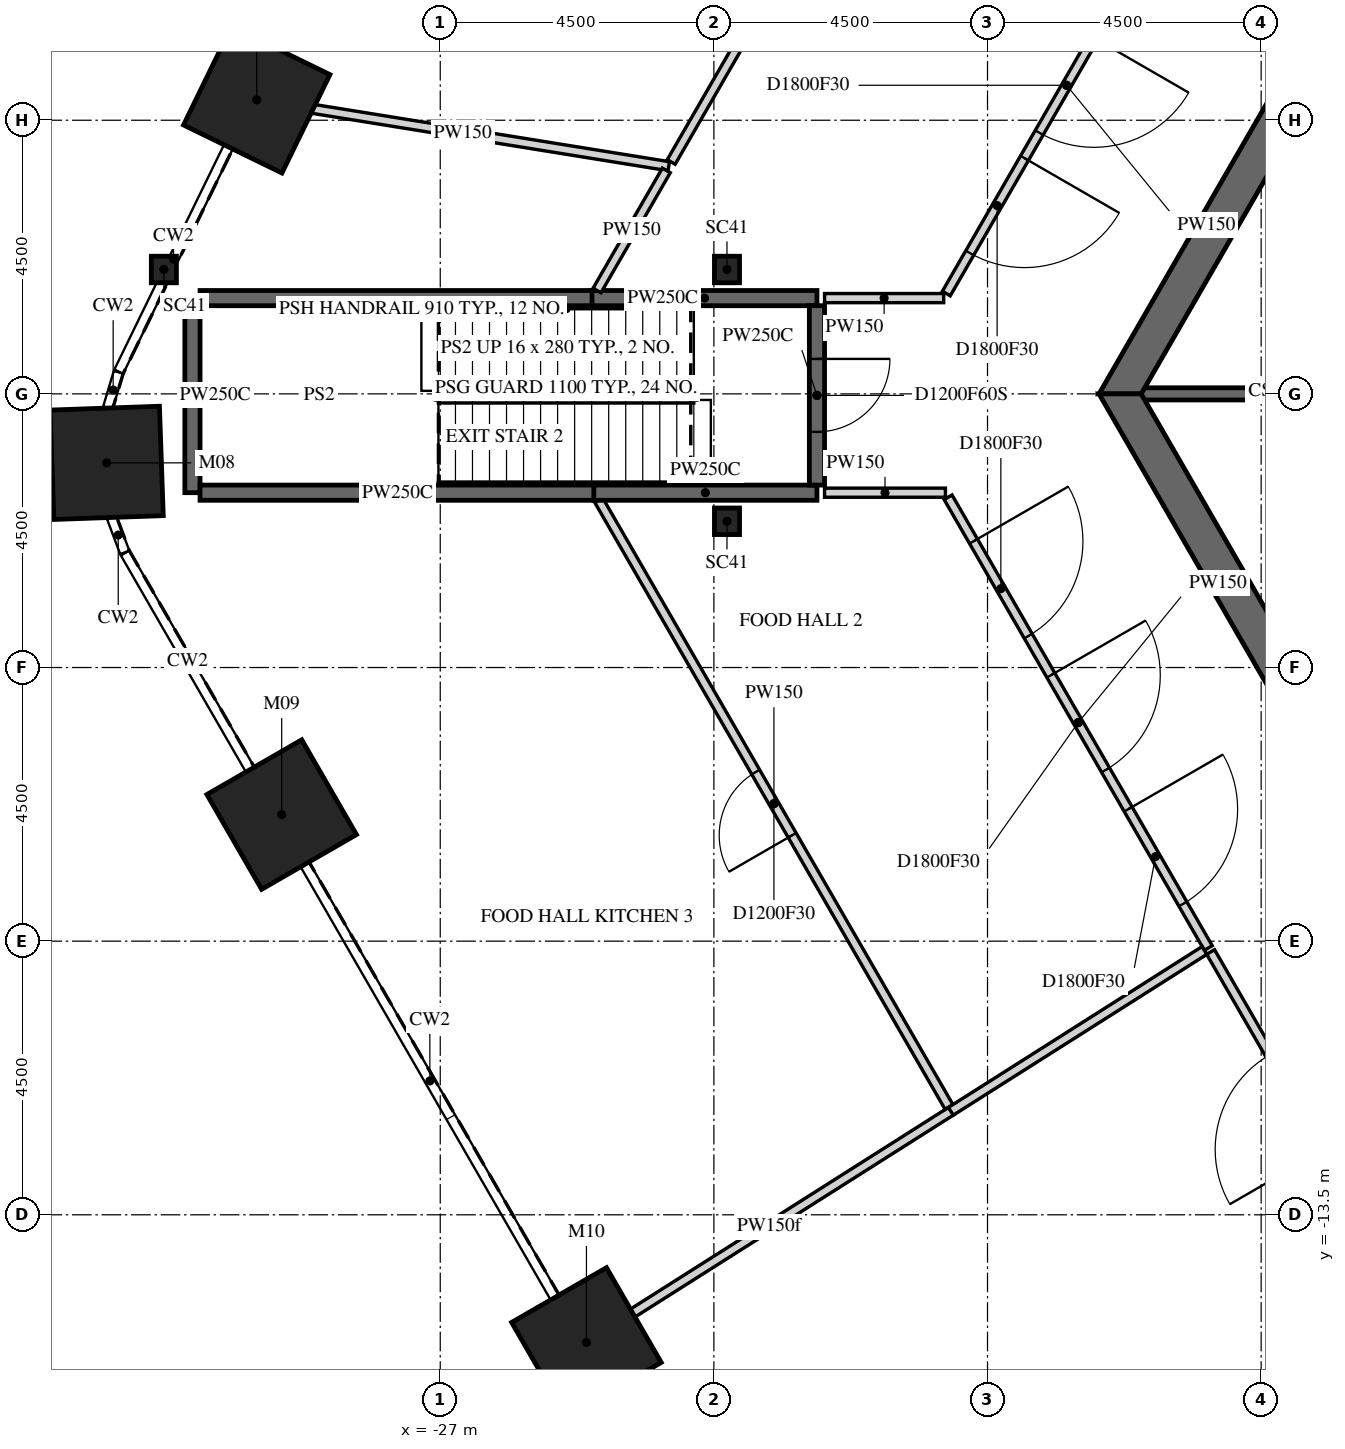
"""IFC4 building model, lengths in metres.
Left out: names, types, materials, properties, quantities, classifications, styles, units other than length and angle.
Written with IfcOpenShell. Run it as: python <this file> out.ifc"""

import sys

from ifc_helpers import new_model, si_unit, direction, frame, frame_2d, origin, origin_2d, place, context, subcontext, project, spatial, polyline, rectangle, i_section, outline, extrude, element, fill, save


model = new_model("IFC4")
c1 = context("Model", 3, precision=1e-05, world=origin(), true_north=direction((0.0, 1.0)))
c2 = subcontext(c1, "Body", "Model", "MODEL_VIEW")
j1 = project(units=[si_unit("LENGTHUNIT", "METRE"), si_unit("PLANEANGLEUNIT", "RADIAN")], contexts=[c1])
p1 = place(None, origin())
s1 = spatial("IfcSite", under=j1, at=p1, CompositionType="ELEMENT")
p2 = place(p1, origin())
s2 = spatial("IfcBuilding", under=s1, at=p2, CompositionType="ELEMENT")
p3 = place(p2, frame((0.0, 0.0, 20.5)))
s3 = spatial("IfcBuildingStorey", under=s2, at=p3, CompositionType="ELEMENT", Elevation=20.5)
for number, where, z_axis, x_axis in (
    (1, (-30.018, 4.836, -0.25), (0.0, 0.0, 1.0), (0.438, 0.899, 0.0)),
    (2, (-32.486, -1.135, -0.25), (0.0, 0.0, 1.0), (-0.035, 0.999, 0.0)),
    (3, (-29.608, -6.918, -0.25), (0.0, 0.0, 1.0), (-0.5, 0.866, 0.0)),
    (4, (-24.596, -15.599, -0.25), (0.0, 0.0, 1.0), (-0.5, 0.866, 0.0)),
):
    element("IfcColumn", number, at=place(p3, frame(where, z_axis=z_axis, x_axis=x_axis)), inside=s3, PredefinedType="COLUMN", context=c2, shape_type="SweptSolid", body=[
        extrude(rectangle(XDim=1.8, YDim=1.8, at=origin_2d()), origin(), (0.0, 0.0, 1.0), 5.5),
    ])
for number, where, z_axis, x_axis in (
    (5, (-31.545, 2.045, -0.25), (0.0, 0.0, 1.0), (1.0, 0.0, 0.0)),
    (6, (-22.285, 2.045, -0.25), (0.0, 0.0, 1.0), (1.0, 0.0, 0.0)),
    (7, (-22.285, -2.095, -0.25), (0.0, 0.0, 1.0), (1.0, 0.0, 0.0)),
):
    element("IfcColumn", number, at=place(p3, frame(where, z_axis=z_axis, x_axis=x_axis)), inside=s3, PredefinedType="COLUMN", context=c2, shape_type="SweptSolid", body=[
        extrude(i_section(OverallWidth=0.412, OverallDepth=0.437, WebThickness=0.036, FlangeThickness=0.058, FilletRadius=0.015, at=origin_2d()), origin(), (0.0, 0.0, 1.0), 5.5),
    ])
p4 = place(p3, frame((-7.91, 13.7, -0.25), z_axis=(0.0, 0.0, 1.0), x_axis=(-0.499999880136, -0.866025472988, 0.0)))
e8 = element("IfcWall", 8, at=p4, inside=s3, PredefinedType="SHEAR", context=c2, shape_type="SweptSolid", body=[
    extrude(outline(polyline([(-0.173, -0.3), (15.993, -0.3), (15.646, 0.3), (0.173, 0.3), (-0.173, -0.3)])), origin(), (0.0, 0.0, 1.0), 5.5),
])
p5 = place(p4, frame((7.039, 0.0, 0.25)))
e9 = element("IfcOpeningElement", 9, at=p5, cuts=e8, PredefinedType="OPENING", context=c2, shape_type="SweptSolid", body=[
    extrude(rectangle(XDim=1.8, YDim=2.4, at=frame_2d((0.9, 1.2))), frame((0.0, 0.31, 0.0), z_axis=(0.0, -1.0, 0.0), x_axis=(1.0, 0.0, 0.0)), (0.0, 0.0, 1.0), 0.62),
])
p6 = place(p3, frame((-15.819, 0.0, -0.25), z_axis=(0.0, 0.0, 1.0), x_axis=(0.499999880136, -0.866025472988, 0.0)))
e10 = element("IfcWall", 10, at=p6, inside=s3, PredefinedType="SHEAR", context=c2, shape_type="SweptSolid", body=[
    extrude(outline(polyline([(-0.173, -0.3), (15.993, -0.3), (15.646, 0.3), (0.173, 0.3), (-0.173, -0.3)])), origin(), (0.0, 0.0, 1.0), 5.5),
])
p7 = place(p6, frame((6.981, 0.0, 0.25)))
e11 = element("IfcOpeningElement", 11, at=p7, cuts=e10, PredefinedType="OPENING", context=c2, shape_type="SweptSolid", body=[
    extrude(rectangle(XDim=1.8, YDim=2.4, at=frame_2d((0.9, 1.2))), frame((0.0, 0.31, 0.0), z_axis=(0.0, -1.0, 0.0), x_axis=(1.0, 0.0, 0.0)), (0.0, 0.0, 1.0), 0.62),
])
p8 = place(p3, frame((-11.547, 0.0, -0.25), z_axis=(0.0, 0.0, 1.0), x_axis=(-1.0, 0.0, 0.0)))
e12 = element("IfcWall", 12, at=p8, inside=s3, PredefinedType="SHEAR", context=c2, shape_type="SweptSolid", body=[
    extrude(rectangle(XDim=3.926, YDim=0.2, at=frame_2d((1.963, 0.0))), origin(), (0.0, 0.0, 1.0), 5.5),
])
p9 = place(p3, frame((-31.075, -1.625, 0.0), z_axis=(0.0, 0.0, 1.0), x_axis=(0.0, 1.0, 0.0)))
e13 = element("IfcWall", 13, at=p9, inside=s3, PredefinedType="PARTITIONING", context=c2, shape_type="SweptSolid", body=[
    extrude(rectangle(XDim=3.2, YDim=0.25, at=frame_2d((1.6, 0.0))), origin(), (0.0, 0.0, 1.0), 5.25),
])
p10 = place(p3, frame((-30.95, 1.575, 0.0), z_axis=(0.0, 0.0, 1.0), x_axis=(1.0, 0.0, 0.0)))
e14 = element("IfcWall", 14, at=p10, inside=s3, PredefinedType="PARTITIONING", context=c2, shape_type="SweptSolid", body=[
    extrude(rectangle(XDim=6.468, YDim=0.25, at=frame_2d((3.234, 0.0))), origin(), (0.0, 0.0, 1.0), 5.25),
])
p11 = place(p3, frame((-30.018, 4.836, 0.0), z_axis=(0.0, 0.0, 1.0), x_axis=(0.987261315122, -0.159107182941, 0.0)))
e15 = element("IfcWall", 15, at=p11, inside=s3, PredefinedType="PARTITIONING", context=c2, shape_type="SweptSolid", body=[
    extrude(rectangle(XDim=6.864, YDim=0.15, at=frame_2d((3.432, 0.0))), origin(), (0.0, 0.0, 1.0), 5.25),
])
p12 = place(p3, frame((-24.596, -15.599, 0.0), z_axis=(0.0, 0.0, 1.0), x_axis=(0.844481327027, 0.535584996339, 0.0)))
e16 = element("IfcWall", 16, at=p12, inside=s3, PredefinedType="PARTITIONING", context=c2, shape_type="SweptSolid", body=[
    extrude(rectangle(XDim=7.116, YDim=0.15, at=frame_2d((3.558, 0.0))), origin(), (0.0, 0.0, 1.0), 4.496),
])
p13 = place(p3, frame((-24.504, 1.575, 0.0), z_axis=(0.0, 0.0, 1.0), x_axis=(1.0, 0.0, 0.0)))
e17 = element("IfcWall", 17, at=p13, inside=s3, PredefinedType="PARTITIONING", context=c2, shape_type="SweptSolid", body=[
    extrude(rectangle(XDim=3.699, YDim=0.25, at=frame_2d((1.85, 0.0))), origin(), (0.0, 0.0, 1.0), 5.25),
])
p14 = place(p3, frame((-18.633, -11.728, 0.0), z_axis=(0.0, 0.0, 1.0), x_axis=(-0.499963358889, 0.866046557506, 0.0)))
e18 = element("IfcWall", 18, at=p14, inside=s3, PredefinedType="PARTITIONING", context=c2, shape_type="SweptSolid", body=[
    extrude(rectangle(XDim=11.521, YDim=0.15, at=frame_2d((5.761, 0.0))), origin(), (0.0, 0.0, 1.0), 5.25),
])
p15 = place(p14, frame((5.161, 0.0, 0.0)))
e19 = element("IfcOpeningElement", 19, at=p15, cuts=e18, PredefinedType="OPENING", context=c2, shape_type="SweptSolid", body=[
    extrude(rectangle(XDim=1.2, YDim=2.1, at=frame_2d((0.6, 1.05))), frame((0.0, 0.085, 0.0), z_axis=(0.0, -1.0, 0.0), x_axis=(1.0, 0.0, 0.0)), (0.0, 0.0, 1.0), 0.17),
])
p16 = place(p3, frame((-24.453, -1.625, 0.0), z_axis=(0.0, 0.0, 1.0), x_axis=(-1.0, 0.0, 0.0)))
e20 = element("IfcWall", 20, at=p16, inside=s3, PredefinedType="PARTITIONING", context=c2, shape_type="SweptSolid", body=[
    extrude(rectangle(XDim=6.497, YDim=0.25, at=frame_2d((3.249, 0.0))), origin(), (0.0, 0.0, 1.0), 5.25),
])
p17 = place(p3, frame((-23.282, 3.675, 0.0), z_axis=(0.0, 0.0, 1.0), x_axis=(-0.49987077196, -0.866100000774, 0.0)))
e21 = element("IfcWall", 21, at=p17, inside=s3, PredefinedType="PARTITIONING", context=c2, shape_type="SweptSolid", body=[
    extrude(rectangle(XDim=2.28, YDim=0.15, at=frame_2d((1.14, 0.0))), origin(), (0.0, 0.0, 1.0), 5.25),
])
p18 = place(p3, frame((-20.805, -1.625, 0.0), z_axis=(0.0, 0.0, 1.0), x_axis=(-1.0, 0.0, 0.0)))
e22 = element("IfcWall", 22, at=p18, inside=s3, PredefinedType="PARTITIONING", context=c2, shape_type="SweptSolid", body=[
    extrude(rectangle(XDim=3.67, YDim=0.25, at=frame_2d((1.835, 0.0))), origin(), (0.0, 0.0, 1.0), 5.25),
])
p19 = place(p3, frame((-20.805, 1.45, 0.0), z_axis=(0.0, 0.0, 1.0), x_axis=(0.0, -1.0, 0.0)))
e23 = element("IfcWall", 23, at=p19, inside=s3, PredefinedType="PARTITIONING", context=c2, shape_type="SweptSolid", body=[
    extrude(rectangle(XDim=2.95, YDim=0.25, at=frame_2d((1.475, 0.0))), origin(), (0.0, 0.0, 1.0), 5.25),
])
p20 = place(p19, frame((0.875, 0.0, 0.0)))
e24 = element("IfcOpeningElement", 24, at=p20, cuts=e23, PredefinedType="OPENING", context=c2, shape_type="SweptSolid", body=[
    extrude(rectangle(XDim=1.2, YDim=2.1, at=frame_2d((0.6, 1.05))), frame((0.0, 0.135, 0.0), z_axis=(0.0, -1.0, 0.0), x_axis=(1.0, 0.0, 0.0)), (0.0, 0.0, 1.0), 0.27),
])
p21 = place(p3, frame((-20.68, 1.575, 0.0), z_axis=(0.0, 0.0, 1.0), x_axis=(1.0, 0.0, 0.0)))
e25 = element("IfcWall", 25, at=p21, inside=s3, PredefinedType="PARTITIONING", context=c2, shape_type="SweptSolid", body=[
    extrude(rectangle(XDim=1.959, YDim=0.15, at=frame_2d((0.979, 0.0))), origin(), (0.0, 0.0, 1.0), 5.25),
])
p22 = place(p3, frame((-19.584, -24.28, 0.0), z_axis=(0.0, 0.0, 1.0), x_axis=(0.627807267634, 0.77836882948, 0.0)))
e26 = element("IfcWall", 26, at=p22, inside=s3, PredefinedType="PARTITIONING", context=c2, shape_type="SweptSolid", body=[
    extrude(rectangle(XDim=12.971, YDim=0.15, at=frame_2d((6.485, 0.0))), origin(), (0.0, 0.0, 1.0), 5.25),
])
p23 = place(p3, frame((-18.692, -1.625, 0.0), z_axis=(0.0, 0.0, 1.0), x_axis=(-1.0, 0.0, 0.0)))
e27 = element("IfcWall", 27, at=p23, inside=s3, PredefinedType="PARTITIONING", context=c2, shape_type="SweptSolid", body=[
    extrude(rectangle(XDim=1.988, YDim=0.15, at=frame_2d((0.994, 0.0))), origin(), (0.0, 0.0, 1.0), 5.25),
])
p24 = place(p3, frame((-18.649, -1.7, 0.0), z_axis=(0.0, 0.0, 1.0), x_axis=(0.499985805234, -0.866033598981, 0.0)))
e28 = element("IfcWall", 28, at=p24, inside=s3, PredefinedType="PARTITIONING", context=c2, shape_type="SweptSolid", body=[
    extrude(rectangle(XDim=8.56, YDim=0.15, at=frame_2d((4.28, 0.0))), origin(), (0.0, 0.0, 1.0), 5.25),
])
p25 = place(p24, frame((0.836, 0.0, 0.0)))
e29 = element("IfcOpeningElement", 29, at=p25, cuts=e28, PredefinedType="OPENING", context=c2, shape_type="SweptSolid", body=[
    extrude(rectangle(XDim=1.8, YDim=2.1, at=frame_2d((0.9, 1.05))), frame((0.0, 0.085, 0.0), z_axis=(0.0, -1.0, 0.0), x_axis=(1.0, 0.0, 0.0)), (0.0, 0.0, 1.0), 0.17),
])
p26 = place(p24, frame((3.38, 0.0, 0.0)))
e30 = element("IfcOpeningElement", 30, at=p26, cuts=e28, PredefinedType="OPENING", context=c2, shape_type="SweptSolid", body=[
    extrude(rectangle(XDim=1.8, YDim=2.1, at=frame_2d((0.9, 1.05))), frame((0.0, 0.085, 0.0), z_axis=(0.0, -1.0, 0.0), x_axis=(1.0, 0.0, 0.0)), (0.0, 0.0, 1.0), 0.17),
])
p27 = place(p24, frame((5.924, 0.0, 0.0)))
e31 = element("IfcOpeningElement", 31, at=p27, cuts=e28, PredefinedType="OPENING", context=c2, shape_type="SweptSolid", body=[
    extrude(rectangle(XDim=1.8, YDim=2.1, at=frame_2d((0.9, 1.05))), frame((0.0, 0.085, 0.0), z_axis=(0.0, -1.0, 0.0), x_axis=(1.0, 0.0, 0.0)), (0.0, 0.0, 1.0), 0.17),
])
p28 = place(p3, frame((-18.603, -11.798, 0.0), z_axis=(0.0, 0.0, 1.0), x_axis=(0.844511305062, 0.535537725677, 0.0)))
e32 = element("IfcWall", 32, at=p28, inside=s3, PredefinedType="PARTITIONING", context=c2, shape_type="SweptSolid", body=[
    extrude(rectangle(XDim=4.938, YDim=0.15, at=frame_2d((2.469, 0.0))), origin(), (0.0, 0.0, 1.0), 4.496),
])
p29 = place(p3, frame((-23.202, 3.813, 0.0), z_axis=(0.0, 0.0, 1.0), x_axis=(0.500012104326, 0.866018415236, 0.0)))
e33 = element("IfcWall", 33, at=p29, inside=s3, PredefinedType="PARTITIONING", context=c2, shape_type="SweptSolid", body=[
    extrude(rectangle(XDim=9.193, YDim=0.15, at=frame_2d((4.597, 0.0))), origin(), (0.0, 0.0, 1.0), 5.25),
])
p30 = place(p29, frame((3.997, 0.0, 0.0)))
e34 = element("IfcOpeningElement", 34, at=p30, cuts=e33, PredefinedType="OPENING", context=c2, shape_type="SweptSolid", body=[
    extrude(rectangle(XDim=1.2, YDim=2.1, at=frame_2d((0.6, 1.05))), frame((0.0, 0.085, 0.0), z_axis=(0.0, -1.0, 0.0), x_axis=(1.0, 0.0, 0.0)), (0.0, 0.0, 1.0), 0.17),
])
p31 = place(p3, frame((-14.722, 8.5, 0.0), z_axis=(0.0, 0.0, 1.0), x_axis=(-0.500085786821, -0.865975869075, 0.0)))
e35 = element("IfcWall", 35, at=p31, inside=s3, PredefinedType="PARTITIONING", context=c2, shape_type="SweptSolid", body=[
    extrude(rectangle(XDim=7.91, YDim=0.15, at=frame_2d((3.955, 0.0))), origin(), (0.0, 0.0, 1.0), 5.25),
])
p32 = place(p31, frame((0.771, 0.0, 0.0)))
e36 = element("IfcOpeningElement", 36, at=p32, cuts=e35, PredefinedType="OPENING", context=c2, shape_type="SweptSolid", body=[
    extrude(rectangle(XDim=1.8, YDim=2.1, at=frame_2d((0.9, 1.05))), frame((0.0, 0.085, 0.0), z_axis=(0.0, -1.0, 0.0), x_axis=(1.0, 0.0, 0.0)), (0.0, 0.0, 1.0), 0.17),
])
p33 = place(p31, frame((3.055, 0.0, 0.0)))
e37 = element("IfcOpeningElement", 37, at=p33, cuts=e35, PredefinedType="OPENING", context=c2, shape_type="SweptSolid", body=[
    extrude(rectangle(XDim=1.8, YDim=2.1, at=frame_2d((0.9, 1.05))), frame((0.0, 0.085, 0.0), z_axis=(0.0, -1.0, 0.0), x_axis=(1.0, 0.0, 0.0)), (0.0, 0.0, 1.0), 0.17),
])
p34 = place(p31, frame((5.339, 0.0, 0.0)))
e38 = element("IfcOpeningElement", 38, at=p34, cuts=e35, PredefinedType="OPENING", context=c2, shape_type="SweptSolid", body=[
    extrude(rectangle(XDim=1.8, YDim=2.1, at=frame_2d((0.9, 1.05))), frame((0.0, 0.085, 0.0), z_axis=(0.0, -1.0, 0.0), x_axis=(1.0, 0.0, 0.0)), (0.0, 0.0, 1.0), 0.17),
])
p35 = place(p3, frame((-11.481, -14.114, 0.0), z_axis=(0.0, 0.0, 1.0), x_axis=(-0.500049947645, 0.865996564577, 0.0)))
e39 = element("IfcWall", 39, at=p35, inside=s3, PredefinedType="PARTITIONING", context=c2, shape_type="SweptSolid", body=[
    extrude(rectangle(XDim=5.7, YDim=0.15, at=frame_2d((2.85, 0.0))), origin(), (0.0, 0.0, 1.0), 5.25),
])
p36 = place(p35, frame((1.95, 0.0, 0.0)))
e40 = element("IfcOpeningElement", 40, at=p36, cuts=e39, PredefinedType="OPENING", context=c2, shape_type="SweptSolid", body=[
    extrude(rectangle(XDim=1.8, YDim=2.1, at=frame_2d((0.9, 1.05))), frame((0.0, 0.085, 0.0), z_axis=(0.0, -1.0, 0.0), x_axis=(1.0, 0.0, 0.0)), (0.0, 0.0, 1.0), 0.17),
])
p37 = place(p15, origin())
e41 = element("IfcDoor", 41, at=p37, inside=s3, OperationType="SINGLE_SWING_RIGHT", PredefinedType="DOOR", context=c2, shape_type="SweptSolid", body=[
    extrude(rectangle(XDim=1.2, YDim=2.1, at=frame_2d((0.6, 1.05))), frame((0.0, 0.025, 0.0), z_axis=(0.0, -1.0, 0.0), x_axis=(1.0, 0.0, 0.0)), (0.0, 0.0, 1.0), 0.05),
])
fill(e19, e41)
p38 = place(p20, origin())
e42 = element("IfcDoor", 42, at=p38, inside=s3, OperationType="SINGLE_SWING_LEFT", PredefinedType="DOOR", context=c2, shape_type="SweptSolid", body=[
    extrude(rectangle(XDim=1.2, YDim=2.1, at=frame_2d((0.6, 1.05))), frame((0.0, 0.025, 0.0), z_axis=(0.0, -1.0, 0.0), x_axis=(1.0, 0.0, 0.0)), (0.0, 0.0, 1.0), 0.05),
])
fill(e24, e42)
p39 = place(p25, origin())
e43 = element("IfcDoor", 43, at=p39, inside=s3, OperationType="DOUBLE_DOOR_SINGLE_SWING", PredefinedType="DOOR", context=c2, shape_type="SweptSolid", body=[
    extrude(rectangle(XDim=1.8, YDim=2.1, at=frame_2d((0.9, 1.05))), frame((0.0, 0.025, 0.0), z_axis=(0.0, -1.0, 0.0), x_axis=(1.0, 0.0, 0.0)), (0.0, 0.0, 1.0), 0.05),
])
fill(e29, e43)
p40 = place(p26, origin())
e44 = element("IfcDoor", 44, at=p40, inside=s3, OperationType="DOUBLE_DOOR_SINGLE_SWING", PredefinedType="DOOR", context=c2, shape_type="SweptSolid", body=[
    extrude(rectangle(XDim=1.8, YDim=2.1, at=frame_2d((0.9, 1.05))), frame((0.0, 0.025, 0.0), z_axis=(0.0, -1.0, 0.0), x_axis=(1.0, 0.0, 0.0)), (0.0, 0.0, 1.0), 0.05),
])
fill(e30, e44)
p41 = place(p27, origin())
e45 = element("IfcDoor", 45, at=p41, inside=s3, OperationType="DOUBLE_DOOR_SINGLE_SWING", PredefinedType="DOOR", context=c2, shape_type="SweptSolid", body=[
    extrude(rectangle(XDim=1.8, YDim=2.1, at=frame_2d((0.9, 1.05))), frame((0.0, 0.025, 0.0), z_axis=(0.0, -1.0, 0.0), x_axis=(1.0, 0.0, 0.0)), (0.0, 0.0, 1.0), 0.05),
])
fill(e31, e45)
p42 = place(p33, origin())
e46 = element("IfcDoor", 46, at=p42, inside=s3, OperationType="DOUBLE_DOOR_SINGLE_SWING", PredefinedType="DOOR", context=c2, shape_type="SweptSolid", body=[
    extrude(rectangle(XDim=1.8, YDim=2.1, at=frame_2d((0.9, 1.05))), frame((0.0, 0.025, 0.0), z_axis=(0.0, -1.0, 0.0), x_axis=(1.0, 0.0, 0.0)), (0.0, 0.0, 1.0), 0.05),
])
fill(e37, e46)
p43 = place(p34, origin())
e47 = element("IfcDoor", 47, at=p43, inside=s3, OperationType="DOUBLE_DOOR_SINGLE_SWING", PredefinedType="DOOR", context=c2, shape_type="SweptSolid", body=[
    extrude(rectangle(XDim=1.8, YDim=2.1, at=frame_2d((0.9, 1.05))), frame((0.0, 0.025, 0.0), z_axis=(0.0, -1.0, 0.0), x_axis=(1.0, 0.0, 0.0)), (0.0, 0.0, 1.0), 0.05),
])
fill(e38, e47)
save(model, sys.argv[1])
